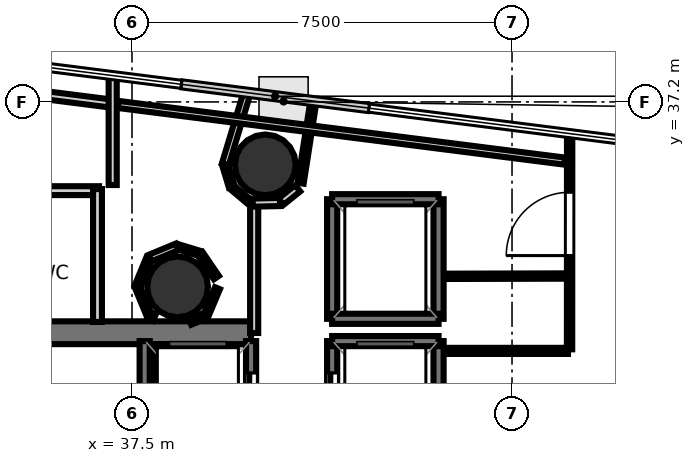
"""IFC4 building model, lengths in metres.
Left out: names, types, materials, properties, quantities, classifications, styles, units other than length and angle.
Written with IfcOpenShell. Run it as: python <this file> out.ifc"""

import sys

from ifc_helpers import new_model, si_unit, direction, frame, frame_2d, origin, origin_2d, place, context, subcontext, project, spatial, rectangle, hollow_circle, extrude, element, fill, save


model = new_model("IFC4")
c1 = context("Model", 3, precision=1e-05, world=origin(), true_north=direction((0.0, 1.0)))
c2 = subcontext(c1, "Body", "Model", "MODEL_VIEW")
j1 = project(units=[si_unit("LENGTHUNIT", "METRE"), si_unit("PLANEANGLEUNIT", "RADIAN")], contexts=[c1])
p1 = place(None, origin())
s1 = spatial("IfcSite", under=j1, at=p1, CompositionType="ELEMENT")
p2 = place(p1, origin())
s2 = spatial("IfcBuilding", under=s1, at=p2, CompositionType="ELEMENT")
p3 = place(p2, frame((0.0, 0.0, 218.8)))
s3 = spatial("IfcBuildingStorey", under=s2, at=p3, CompositionType="ELEMENT", Elevation=218.8)
p4 = place(p3, frame((29.33, 32.645, 0.0), z_axis=(0.0, 0.0, 1.0), x_axis=(1.0, 0.0, 0.0)))
e1 = element("IfcWall", 1, at=p4, inside=s3, PredefinedType="SHEAR", context=c2, shape_type="SweptSolid", body=[
    extrude(rectangle(XDim=10.52, YDim=0.45, at=frame_2d((5.26, 0.0))), origin(), (0.0, 0.0, 1.0), 3.52),
])
p5 = place(p4, frame((0.895, 0.0, 0.0)))
e2 = element("IfcOpeningElement", 2, at=p5, cuts=e1, PredefinedType="OPENING", context=c2, shape_type="SweptSolid", body=[
    extrude(rectangle(XDim=1.25, YDim=2.15, at=frame_2d((0.625, 1.075))), frame((0.0, 0.235, 0.0), z_axis=(0.0, -1.0, 0.0), x_axis=(1.0, 0.0, 0.0)), (0.0, 0.0, 1.0), 0.47),
])
p6 = place(p3, frame((38.18, 24.98, 0.0), z_axis=(0.0, 0.0, 1.0), x_axis=(0.0, 1.0, 0.0)))
e3 = element("IfcWall", 3, at=p6, inside=s3, PredefinedType="SHEAR", context=c2, shape_type="SweptSolid", body=[
    extrude(rectangle(XDim=7.44, YDim=0.45, at=frame_2d((3.72, 0.0))), origin(), (0.0, 0.0, 1.0), 3.52),
])
for number, where, z_axis, x_axis in (
    (4, (38.4, 33.55, 0.0), (0.0, 0.0, 1.0), (1.0, 0.0, 0.0)),
    (5, (40.131, 35.958, 0.0), (0.0, 0.0, 1.0), (1.0, 0.0, 0.0)),
):
    element("IfcColumn", number, at=place(p3, frame(where, z_axis=z_axis, x_axis=x_axis)), inside=s3, PredefinedType="COLUMN", context=c2, shape_type="SweptSolid", body=[
        extrude(hollow_circle(Radius=0.6, WallThickness=0.03, at=origin_2d()), origin(), (0.0, 0.0, 1.0), 3.7),
    ])
p7 = place(p3, frame((39.85, 30.12, 0.0), z_axis=(0.0, 0.0, 1.0), x_axis=(0.0, 1.0, 0.0)))
e6 = element("IfcWall", 6, at=p7, inside=s3, PredefinedType="SOLIDWALL", context=c2, shape_type="SweptSolid", body=[
    extrude(rectangle(XDim=2.36, YDim=0.2, at=frame_2d((1.18, 0.0))), origin(), (0.0, 0.0, 1.0), 3.52),
])
p8 = place(p7, frame((0.63, 0.0, 0.0)))
e7 = element("IfcOpeningElement", 7, at=p8, cuts=e6, PredefinedType="OPENING", context=c2, shape_type="SweptSolid", body=[
    extrude(rectangle(XDim=1.1, YDim=2.15, at=frame_2d((0.55, 1.075))), frame((0.0, 0.11, 0.0), z_axis=(0.0, -1.0, 0.0), x_axis=(1.0, 0.0, 0.0)), (0.0, 0.0, 1.0), 0.22),
])
for number, where, z_axis, x_axis in (
    (8, (37.75, 30.12, 0.0), (0.0, 0.0, 1.0), (0.0, 1.0, 0.0)),
    (9, (43.55, 30.12, 0.0), (0.0, 0.0, 1.0), (0.0, 1.0, 0.0)),
):
    element("IfcWall", number, at=place(p3, frame(where, z_axis=z_axis, x_axis=x_axis)), inside=s3, PredefinedType="SOLIDWALL", context=c2, shape_type="SweptSolid", body=[
        extrude(rectangle(XDim=2.36, YDim=0.2, at=frame_2d((1.18, 0.0))), origin(), (0.0, 0.0, 1.0), 3.52),
    ])
p9 = place(p3, frame((41.45, 30.12, 0.0), z_axis=(0.0, 0.0, 1.0), x_axis=(0.0, 1.0, 0.0)))
e10 = element("IfcWall", 10, at=p9, inside=s3, PredefinedType="SOLIDWALL", context=c2, shape_type="SweptSolid", body=[
    extrude(rectangle(XDim=2.36, YDim=0.2, at=frame_2d((1.18, 0.0))), origin(), (0.0, 0.0, 1.0), 3.52),
])
p10 = place(p9, frame((0.63, 0.0, 0.0)))
e11 = element("IfcOpeningElement", 11, at=p10, cuts=e10, PredefinedType="OPENING", context=c2, shape_type="SweptSolid", body=[
    extrude(rectangle(XDim=1.1, YDim=2.15, at=frame_2d((0.55, 1.075))), frame((0.0, 0.11, 0.0), z_axis=(0.0, -1.0, 0.0), x_axis=(1.0, 0.0, 0.0)), (0.0, 0.0, 1.0), 0.22),
])
p11 = place(p3, frame((41.45, 32.48, 0.0), z_axis=(0.0, 0.0, 1.0), x_axis=(1.0, 0.0, 0.0)))
e12 = element("IfcWall", 12, at=p11, inside=s3, PredefinedType="SOLIDWALL", context=c2, shape_type="SweptSolid", body=[
    extrude(rectangle(XDim=2.1, YDim=0.2, at=frame_2d((1.05, 0.0))), origin(), (0.0, 0.0, 1.0), 3.52),
])
for number, where, z_axis, x_axis in (
    (13, (43.55, 32.92, 0.0), (0.0, 0.0, 1.0), (0.0, 1.0, 0.0)),
    (14, (41.45, 32.92, 0.0), (0.0, 0.0, 1.0), (0.0, 1.0, 0.0)),
):
    element("IfcWall", number, at=place(p3, frame(where, z_axis=z_axis, x_axis=x_axis)), inside=s3, PredefinedType="SOLIDWALL", context=c2, shape_type="SweptSolid", body=[
        extrude(rectangle(XDim=2.36, YDim=0.2, at=frame_2d((1.18, 0.0))), origin(), (0.0, 0.0, 1.0), 3.52),
    ])
for number, where, z_axis, x_axis in (
    (15, (41.45, 35.28, 0.0), (0.0, 0.0, 1.0), (1.0, 0.0, 0.0)),
    (16, (41.45, 32.92, 0.0), (0.0, 0.0, 1.0), (1.0, 0.0, 0.0)),
):
    element("IfcWall", number, at=place(p3, frame(where, z_axis=z_axis, x_axis=x_axis)), inside=s3, PredefinedType="SOLIDWALL", context=c2, shape_type="SweptSolid", body=[
        extrude(rectangle(XDim=2.1, YDim=0.2, at=frame_2d((1.05, 0.0))), origin(), (0.0, 0.0, 1.0), 3.52),
    ])
p12 = place(p3, frame((39.911, 32.64, 0.0), z_axis=(0.0, 0.0, 1.0), x_axis=(0.0, 1.0, 0.0)))
e17 = element("IfcWall", 17, at=p12, inside=s3, PredefinedType="PARTITIONING", context=c2, shape_type="SweptSolid", body=[
    extrude(rectangle(XDim=2.604, YDim=0.16, at=frame_2d((1.302, 0.0))), origin(), (0.0, 0.0, 1.0), 2.84),
])
p13 = place(p3, frame((39.881, 35.213, 0.0), z_axis=(0.0, 0.0, 1.0), x_axis=(0.999756500784, 0.02206669754, 0.0)))
e18 = element("IfcWall", 18, at=p13, inside=s3, PredefinedType="PARTITIONING", context=c2, shape_type="SweptSolid", body=[
    extrude(rectangle(XDim=0.542, YDim=0.16, at=frame_2d((0.271, 0.0))), origin(), (0.0, 0.0, 1.0), 2.84),
])
p14 = place(p3, frame((40.441, 35.232, 0.0), z_axis=(0.0, 0.0, 1.0), x_axis=(0.778714564707, 0.627378376033, 0.0)))
e19 = element("IfcWall", 19, at=p14, inside=s3, PredefinedType="PARTITIONING", context=c2, shape_type="SweptSolid", body=[
    extrude(rectangle(XDim=0.421, YDim=0.16, at=frame_2d((0.21, 0.0))), origin(), (0.0, 0.0, 1.0), 2.84),
])
p15 = place(p3, frame((32.55, 35.449, 0.0), z_axis=(0.0, 0.0, 1.0), x_axis=(1.0, 0.0, 0.0)))
e20 = element("IfcWall", 20, at=p15, inside=s3, PredefinedType="PLUMBINGWALL", context=c2, shape_type="SweptSolid", body=[
    extrude(rectangle(XDim=4.3, YDim=0.175, at=frame_2d((2.15, 0.0))), origin(), (0.0, 0.0, 1.0), 2.84),
])
p16 = place(p15, frame((1.72, 0.0, 0.0)))
e21 = element("IfcOpeningElement", 21, at=p16, cuts=e20, PredefinedType="OPENING", context=c2, shape_type="SweptSolid", body=[
    extrude(rectangle(XDim=0.86, YDim=2.05, at=frame_2d((0.43, 1.025))), frame((0.0, 0.097, 0.0), z_axis=(0.0, -1.0, 0.0), x_axis=(1.0, 0.0, 0.0)), (0.0, 0.0, 1.0), 0.195),
])
p17 = place(p3, frame((36.819, 35.48, 0.0), z_axis=(0.0, 0.0, 1.0), x_axis=(0.0, -1.0, 0.0)))
e22 = element("IfcWall", 22, at=p17, inside=s3, PredefinedType="PLUMBINGWALL", context=c2, shape_type="SweptSolid", body=[
    extrude(rectangle(XDim=2.622, YDim=0.175, at=frame_2d((1.311, 0.0))), origin(), (0.0, 0.0, 1.0), 2.84),
])
p18 = place(p3, frame((26.822, 38.471, 0.0), z_axis=(0.0, 0.0, 1.0), x_axis=(0.992041870869, -0.12590840497, 0.0)))
e23 = element("IfcWall", 23, at=p18, inside=s3, PredefinedType="PARTITIONING", context=c2, shape_type="SweptSolid", body=[
    extrude(rectangle(XDim=10.407, YDim=0.16, at=frame_2d((5.203, 0.0))), origin(), (0.0, 0.0, 1.0), 2.84),
])
p19 = place(p3, frame((37.119, 37.74, 0.0), z_axis=(0.0, 0.0, 1.0), x_axis=(0.0, -1.0, 0.0)))
e24 = element("IfcWall", 24, at=p19, inside=s3, PredefinedType="PARTITIONING", context=c2, shape_type="SweptSolid", body=[
    extrude(rectangle(XDim=2.179, YDim=0.16, at=frame_2d((1.09, 0.0))), origin(), (0.0, 0.0, 1.0), 2.84),
])
p20 = place(p3, frame((43.72, 32.287, 0.0), z_axis=(0.0, 0.0, 1.0), x_axis=(1.0, 0.0, 0.0)))
e25 = element("IfcWall", 25, at=p20, inside=s3, PredefinedType="PARTITIONING", context=c2, shape_type="SweptSolid", body=[
    extrude(rectangle(XDim=2.385, YDim=0.12, at=frame_2d((1.192, 0.0))), origin(), (0.0, 0.0, 1.0), 2.84),
])
p21 = place(p3, frame((46.135, 32.318, 0.0), z_axis=(0.0, 0.0, 1.0), x_axis=(0.000399588962, 0.999999920164, 0.0)))
e26 = element("IfcWall", 26, at=p21, inside=s3, PredefinedType="PARTITIONING", context=c2, shape_type="SweptSolid", body=[
    extrude(rectangle(XDim=4.277, YDim=0.105, at=frame_2d((2.138, 0.0))), origin(), (0.0, 0.0, 1.0), 2.84),
])
p22 = place(p21, frame((1.849, 0.0, 0.0)))
e27 = element("IfcOpeningElement", 27, at=p22, cuts=e26, PredefinedType="OPENING", context=c2, shape_type="SweptSolid", body=[
    extrude(rectangle(XDim=1.25, YDim=2.2, at=frame_2d((0.625, 1.1))), frame((0.0, 0.062, 0.0), z_axis=(0.0, -1.0, 0.0), x_axis=(1.0, 0.0, 0.0)), (0.0, 0.0, 1.0), 0.125),
])
p23 = place(p3, frame((40.828, 35.595, 0.0), z_axis=(0.0, 0.0, 1.0), x_axis=(0.154475519744, 0.98799661629, 0.0)))
e28 = element("IfcWall", 28, at=p23, inside=s3, PredefinedType="PARTITIONING", context=c2, shape_type="SweptSolid", body=[
    extrude(rectangle(XDim=1.661, YDim=0.12, at=frame_2d((0.831, 0.0))), origin(), (0.0, 0.0, 1.0), 2.84),
])
p24 = place(p3, frame((39.777, 37.402, 0.0), z_axis=(0.0, 0.0, 1.0), x_axis=(-0.290273972187, -0.956943583014, 0.0)))
e29 = element("IfcWall", 29, at=p24, inside=s3, PredefinedType="PARTITIONING", context=c2, shape_type="SweptSolid", body=[
    extrude(rectangle(XDim=1.5, YDim=0.14, at=frame_2d((0.75, 0.0))), origin(), (0.0, 0.0, 1.0), 2.84),
])
p25 = place(p3, frame((39.341, 35.949, 0.0), z_axis=(0.0, 0.0, 1.0), x_axis=(0.290544943199, -0.956861346268, 0.0)))
e30 = element("IfcWall", 30, at=p25, inside=s3, PredefinedType="PARTITIONING", context=c2, shape_type="SweptSolid", body=[
    extrude(rectangle(XDim=0.441, YDim=0.12, at=frame_2d((0.221, 0.0))), origin(), (0.0, 0.0, 1.0), 2.84),
])
p26 = place(p3, frame((39.479, 35.512, 0.0), z_axis=(0.0, 0.0, 1.0), x_axis=(0.764834909506, -0.644226327622, 0.0)))
e31 = element("IfcWall", 31, at=p26, inside=s3, PredefinedType="PARTITIONING", context=c2, shape_type="SweptSolid", body=[
    extrude(rectangle(XDim=0.415, YDim=0.105, at=frame_2d((0.208, 0.0))), origin(), (0.0, 0.0, 1.0), 2.84),
])
p27 = place(p3, frame((39.166, 33.733, 0.0), z_axis=(0.0, 0.0, 1.0), x_axis=(-0.563162199293, 0.826346378517, 0.0)))
e32 = element("IfcWall", 32, at=p27, inside=s3, PredefinedType="PARTITIONING", context=c2, shape_type="SweptSolid", body=[
    extrude(rectangle(XDim=0.564, YDim=0.12, at=frame_2d((0.282, 0.0))), origin(), (0.0, 0.0, 1.0), 2.84),
])
p28 = place(p3, frame((38.831, 34.212, 0.0), z_axis=(0.0, 0.0, 1.0), x_axis=(-0.957061618741, 0.289884559665, 0.0)))
e33 = element("IfcWall", 33, at=p28, inside=s3, PredefinedType="PARTITIONING", context=c2, shape_type="SweptSolid", body=[
    extrude(rectangle(XDim=0.441, YDim=0.105, at=frame_2d((0.221, 0.0))), origin(), (0.0, 0.0, 1.0), 2.84),
])
p29 = place(p3, frame((38.388, 34.339, 0.0), z_axis=(0.0, 0.0, 1.0), x_axis=(-0.923894108428, -0.382648241093, 0.0)))
e34 = element("IfcWall", 34, at=p29, inside=s3, PredefinedType="PARTITIONING", context=c2, shape_type="SweptSolid", body=[
    extrude(rectangle(XDim=0.582, YDim=0.14, at=frame_2d((0.291, 0.0))), origin(), (0.0, 0.0, 1.0), 2.84),
])
p30 = place(p3, frame((37.834, 34.099, 0.0), z_axis=(0.0, 0.0, 1.0), x_axis=(-0.382796622927, -0.923832639322, 0.0)))
e35 = element("IfcWall", 35, at=p30, inside=s3, PredefinedType="PARTITIONING", context=c2, shape_type="SweptSolid", body=[
    extrude(rectangle(XDim=0.582, YDim=0.12, at=frame_2d((0.291, 0.0))), origin(), (0.0, 0.0, 1.0), 2.84),
])
p31 = place(p3, frame((37.611, 33.538, 0.0), z_axis=(0.0, 0.0, 1.0), x_axis=(0.382796622927, -0.923832639322, 0.0)))
e36 = element("IfcWall", 36, at=p31, inside=s3, PredefinedType="PARTITIONING", context=c2, shape_type="SweptSolid", body=[
    extrude(rectangle(XDim=0.582, YDim=0.105, at=frame_2d((0.291, 0.0))), origin(), (0.0, 0.0, 1.0), 2.84),
])
p32 = place(p3, frame((37.851, 32.984, 0.0), z_axis=(0.0, 0.0, 1.0), x_axis=(0.924628481531, -0.380870281252, 0.0)))
e37 = element("IfcWall", 37, at=p32, inside=s3, PredefinedType="PARTITIONING", context=c2, shape_type="SweptSolid", body=[
    extrude(rectangle(XDim=0.102, YDim=0.14, at=frame_2d((0.051, 0.0))), origin(), (0.0, 0.0, 1.0), 2.84),
])
p33 = place(p3, frame((38.645, 32.858, 0.0), z_axis=(0.0, 0.0, 1.0), x_axis=(0.923908393326, 0.382613748761, 0.0)))
e38 = element("IfcWall", 38, at=p33, inside=s3, PredefinedType="PARTITIONING", context=c2, shape_type="SweptSolid", body=[
    extrude(rectangle(XDim=0.329, YDim=0.12, at=frame_2d((0.165, 0.0))), origin(), (0.0, 0.0, 1.0), 2.84),
])
p34 = place(p3, frame((38.966, 33.0, 0.0), z_axis=(0.0, 0.0, 1.0), x_axis=(0.389247517771, 0.921133198788, 0.0)))
e39 = element("IfcWall", 39, at=p34, inside=s3, PredefinedType="PARTITIONING", context=c2, shape_type="SweptSolid", body=[
    extrude(rectangle(XDim=0.568, YDim=0.105, at=frame_2d((0.284, 0.0))), origin(), (0.0, 0.0, 1.0), 2.84),
])
p35 = place(p3, frame((37.226, 37.15, 0.0), z_axis=(0.0, 0.0, 1.0), x_axis=(0.992042774502, -0.125901284976, 0.0)))
e40 = element("IfcWall", 40, at=p35, inside=s3, PredefinedType="PARTITIONING", context=c2, shape_type="SweptSolid", body=[
    extrude(rectangle(XDim=8.885, YDim=0.14, at=frame_2d((4.443, 0.0))), origin(), (0.0, 0.0, 1.0), 2.84),
])
p36 = place(p3, frame((46.043, 33.764, 0.0), z_axis=(0.0, 0.0, 1.0), x_axis=(-0.999996819601, -0.002522060075, 0.0)))
e41 = element("IfcWall", 41, at=p36, inside=s3, PredefinedType="PARTITIONING", context=c2, shape_type="SweptSolid", body=[
    extrude(rectangle(XDim=2.323, YDim=0.105, at=frame_2d((1.162, 0.0))), origin(), (0.0, 0.0, 1.0), 2.84),
])
p37 = place(p8, origin())
e42 = element("IfcDoor", 42, at=p37, inside=s3, OperationType="SLIDING_TO_LEFT", PredefinedType="DOOR", context=c2, shape_type="SweptSolid", body=[
    extrude(rectangle(XDim=1.1, YDim=2.15, at=frame_2d((0.55, 1.075))), frame((0.0, 0.025, 0.0), z_axis=(0.0, -1.0, 0.0), x_axis=(1.0, 0.0, 0.0)), (0.0, 0.0, 1.0), 0.05),
])
fill(e7, e42)
p38 = place(p10, origin())
e43 = element("IfcDoor", 43, at=p38, inside=s3, OperationType="SLIDING_TO_LEFT", PredefinedType="DOOR", context=c2, shape_type="SweptSolid", body=[
    extrude(rectangle(XDim=1.1, YDim=2.15, at=frame_2d((0.55, 1.075))), frame((0.0, 0.025, 0.0), z_axis=(0.0, -1.0, 0.0), x_axis=(1.0, 0.0, 0.0)), (0.0, 0.0, 1.0), 0.05),
])
fill(e11, e43)
p39 = place(p22, origin())
e44 = element("IfcDoor", 44, at=p39, inside=s3, OperationType="SINGLE_SWING_LEFT", PredefinedType="DOOR", context=c2, shape_type="SweptSolid", body=[
    extrude(rectangle(XDim=1.25, YDim=2.2, at=frame_2d((0.625, 1.1))), frame((0.0, 0.025, 0.0), z_axis=(0.0, -1.0, 0.0), x_axis=(1.0, 0.0, 0.0)), (0.0, 0.0, 1.0), 0.05),
])
fill(e27, e44)
save(model, sys.argv[1])
